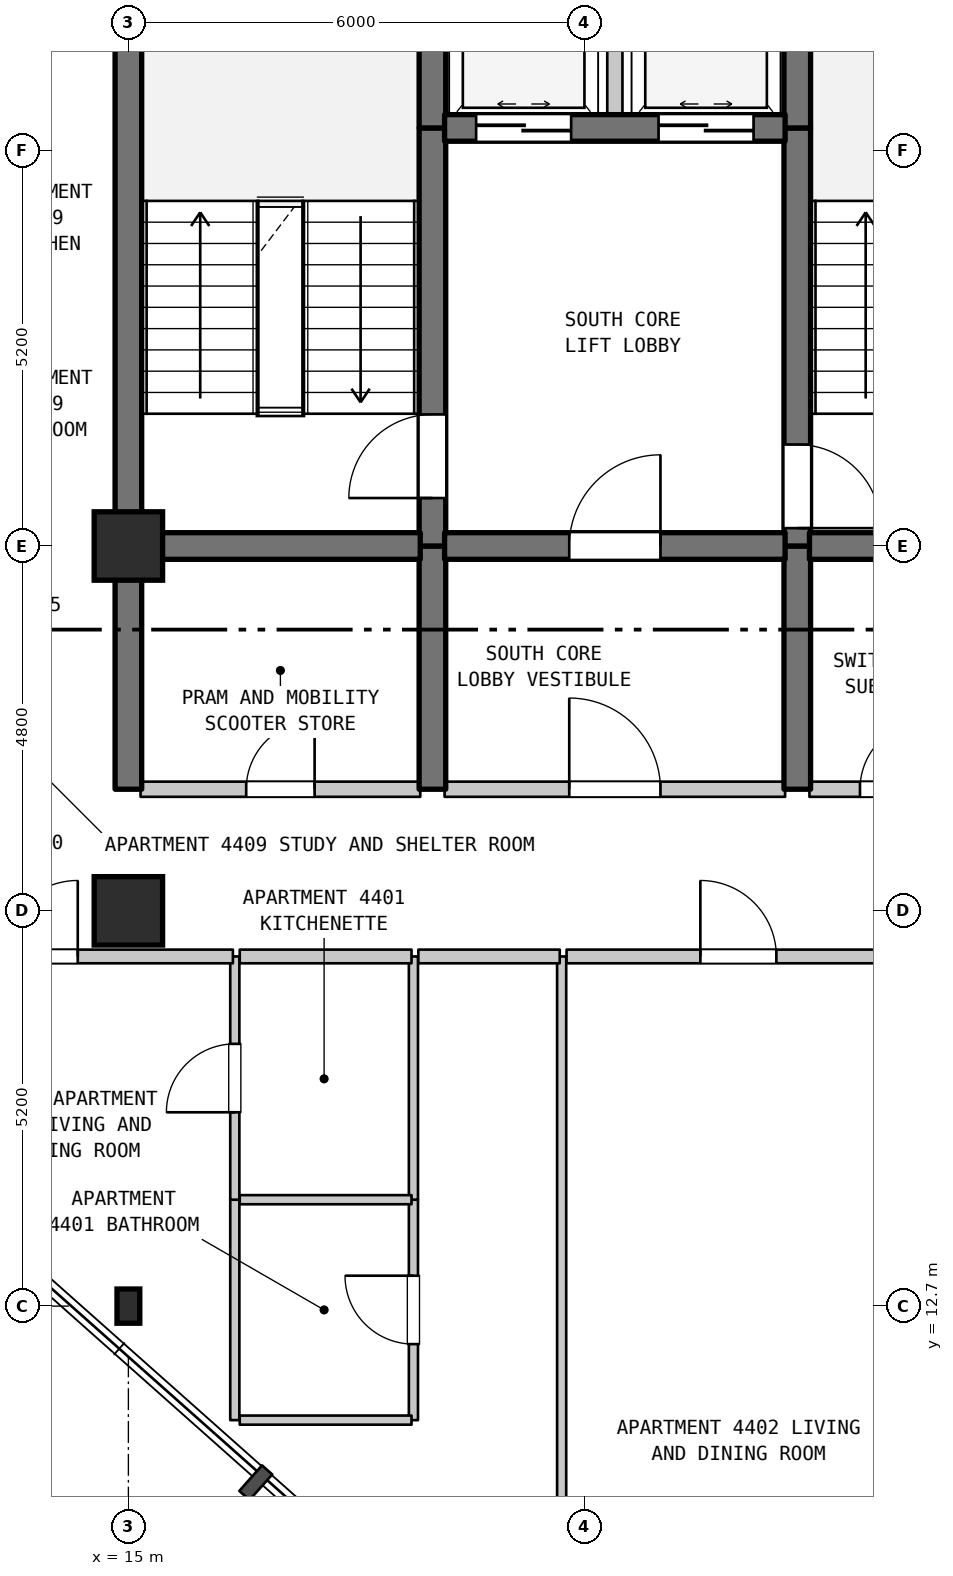
"""IFC4 building model, lengths in metres.
Left out: names, types, materials, properties, quantities, classifications, styles, units other than length and angle.
Written with IfcOpenShell. Run it as: python <this file> out.ifc"""

import sys

from ifc_helpers import new_model, si_unit, direction, frame, frame_2d, origin, origin_2d, place, context, subcontext, project, spatial, rectangle, i_section, extrude, element, fill, save


model = new_model("IFC4")
c1 = context("Model", 3, precision=1e-05, world=origin(), true_north=direction((0.0, 1.0)))
c2 = subcontext(c1, "Body", "Model", "MODEL_VIEW")
j1 = project(units=[si_unit("LENGTHUNIT", "METRE"), si_unit("PLANEANGLEUNIT", "RADIAN")], contexts=[c1])
p1 = place(None, origin())
s1 = spatial("IfcSite", under=j1, at=p1, CompositionType="ELEMENT")
p2 = place(p1, origin())
s2 = spatial("IfcBuilding", under=s1, at=p2, CompositionType="ELEMENT")
p3 = place(p2, frame((0.0, 0.0, 180.2)))
s3 = spatial("IfcBuildingStorey", under=s2, at=p3, CompositionType="ELEMENT", Elevation=180.2)
p4 = place(p3, frame((15.0, 12.7, 0.0), z_axis=(0.0, 0.0, 1.0), x_axis=(1.0, 0.0, 0.0)))
e1 = element("IfcColumn", 1, at=p4, inside=s3, PredefinedType="COLUMN", context=c2, shape_type="SweptSolid", body=[
    extrude(i_section(OverallWidth=0.3, OverallDepth=0.45, WebThickness=0.014, FlangeThickness=0.026, FilletRadius=0.027, at=origin_2d()), origin(), (0.0, 0.0, 1.0), 3.7),
])
for number, where, z_axis, x_axis in (
    (2, (15.0, 17.9, 0.0), (0.0, 0.0, 1.0), (1.0, 0.0, 0.0)),
    (3, (15.0, 22.7, 0.0), (0.0, 0.0, 1.0), (1.0, 0.0, 0.0)),
):
    element("IfcColumn", number, at=place(p3, frame(where, z_axis=z_axis, x_axis=x_axis)), inside=s3, PredefinedType="COLUMN", context=c2, shape_type="SweptSolid", body=[
        extrude(rectangle(XDim=0.9, YDim=0.9, at=origin_2d()), origin(), (0.0, 0.0, 1.0), 3.7),
    ])
p5 = place(p3, frame((15.0, 19.5, 0.0), z_axis=(0.0, 0.0, 1.0), x_axis=(0.0, 1.0, 0.0)))
e4 = element("IfcWall", 4, at=p5, inside=s3, PredefinedType="SHEAR", context=c2, shape_type="SweptSolid", body=[
    extrude(rectangle(XDim=3.2, YDim=0.35, at=frame_2d((1.6, 0.0))), origin(), (0.0, 0.0, 1.0), 3.38),
])
p6 = place(p3, frame((15.0, 22.7, 0.0), z_axis=(0.0, 0.0, 1.0), x_axis=(0.0, 1.0, 0.0)))
e5 = element("IfcWall", 5, at=p6, inside=s3, PredefinedType="SHEAR", context=c2, shape_type="SweptSolid", body=[
    extrude(rectangle(XDim=6.8, YDim=0.35, at=frame_2d((3.4, 0.0))), origin(), (0.0, 0.0, 1.0), 3.38),
])
p7 = place(p3, frame((16.4, 11.2, 0.0), z_axis=(0.0, 0.0, 1.0), x_axis=(0.0, 1.0, 0.0)))
e6 = element("IfcWall", 6, at=p7, inside=s3, PredefinedType="PARTITIONING", context=c2, shape_type="SweptSolid", body=[
    extrude(rectangle(XDim=2.9, YDim=0.12, at=frame_2d((1.45, 0.0))), origin(), (0.0, 0.0, 1.0), 3.38),
])
p8 = place(p3, frame((16.4, 14.1, 0.0), z_axis=(0.0, 0.0, 1.0), x_axis=(0.0, 1.0, 0.0)))
e7 = element("IfcWall", 7, at=p8, inside=s3, PredefinedType="PARTITIONING", context=c2, shape_type="SweptSolid", body=[
    extrude(rectangle(XDim=3.2, YDim=0.12, at=frame_2d((1.6, 0.0))), origin(), (0.0, 0.0, 1.0), 3.38),
])
p9 = place(p8, frame((1.15, 0.0, 0.0)))
e8 = element("IfcOpeningElement", 8, at=p9, cuts=e7, PredefinedType="OPENING", context=c2, shape_type="SweptSolid", body=[
    extrude(rectangle(XDim=0.9, YDim=2.15, at=frame_2d((0.45, 1.075))), frame((0.0, 0.07, 0.0), z_axis=(0.0, -1.0, 0.0), x_axis=(1.0, 0.0, 0.0)), (0.0, 0.0, 1.0), 0.14),
])
p10 = place(p3, frame((18.75, 11.2, 0.0), z_axis=(0.0, 0.0, 1.0), x_axis=(0.0, 1.0, 0.0)))
e9 = element("IfcWall", 9, at=p10, inside=s3, PredefinedType="PARTITIONING", context=c2, shape_type="SweptSolid", body=[
    extrude(rectangle(XDim=2.9, YDim=0.12, at=frame_2d((1.45, 0.0))), origin(), (0.0, 0.0, 1.0), 3.38),
])
p11 = place(p10, frame((1.0, 0.0, 0.0)))
e10 = element("IfcOpeningElement", 10, at=p11, cuts=e9, PredefinedType="OPENING", context=c2, shape_type="SweptSolid", body=[
    extrude(rectangle(XDim=0.9, YDim=2.1, at=frame_2d((0.45, 1.05))), frame((0.0, 0.07, 0.0), z_axis=(0.0, -1.0, 0.0), x_axis=(1.0, 0.0, 0.0)), (0.0, 0.0, 1.0), 0.14),
])
p12 = place(p3, frame((18.75, 14.1, 0.0), z_axis=(0.0, 0.0, 1.0), x_axis=(0.0, 1.0, 0.0)))
e11 = element("IfcWall", 11, at=p12, inside=s3, PredefinedType="PARTITIONING", context=c2, shape_type="SweptSolid", body=[
    extrude(rectangle(XDim=3.2, YDim=0.12, at=frame_2d((1.6, 0.0))), origin(), (0.0, 0.0, 1.0), 3.38),
])
p13 = place(p3, frame((19.0, 19.5, 0.0), z_axis=(0.0, 0.0, 1.0), x_axis=(0.0, 1.0, 0.0)))
e12 = element("IfcWall", 12, at=p13, inside=s3, PredefinedType="SHEAR", context=c2, shape_type="SweptSolid", body=[
    extrude(rectangle(XDim=3.2, YDim=0.35, at=frame_2d((1.6, 0.0))), origin(), (0.0, 0.0, 1.0), 3.38),
])
p14 = place(p3, frame((19.0, 22.7, 0.0), z_axis=(0.0, 0.0, 1.0), x_axis=(0.0, 1.0, 0.0)))
e13 = element("IfcWall", 13, at=p14, inside=s3, PredefinedType="SHEAR", context=c2, shape_type="SweptSolid", body=[
    extrude(rectangle(XDim=5.5, YDim=0.35, at=frame_2d((2.75, 0.0))), origin(), (0.0, 0.0, 1.0), 3.38),
])
p15 = place(p14, frame((0.631, 0.0, 0.0)))
e14 = element("IfcOpeningElement", 14, at=p15, cuts=e13, PredefinedType="OPENING", context=c2, shape_type="SweptSolid", body=[
    extrude(rectangle(XDim=1.1, YDim=2.15, at=frame_2d((0.55, 1.075))), frame((0.0, 0.185, 0.0), z_axis=(0.0, -1.0, 0.0), x_axis=(1.0, 0.0, 0.0)), (0.0, 0.0, 1.0), 0.37),
])
p16 = place(p3, frame((19.0, 28.2, 0.0), z_axis=(0.0, 0.0, 1.0), x_axis=(0.0, 1.0, 0.0)))
e15 = element("IfcWall", 15, at=p16, inside=s3, PredefinedType="SHEAR", context=c2, shape_type="SweptSolid", body=[
    extrude(rectangle(XDim=1.3, YDim=0.35, at=frame_2d((0.65, 0.0))), origin(), (0.0, 0.0, 1.0), 3.38),
])
p17 = place(p3, frame((20.7, 6.977, 0.0), z_axis=(0.0, 0.0, 1.0), x_axis=(0.0, 1.0, 0.0)))
e16 = element("IfcWall", 16, at=p17, inside=s3, PredefinedType="PARTITIONING", context=c2, shape_type="SweptSolid", body=[
    extrude(rectangle(XDim=10.323, YDim=0.12, at=frame_2d((5.162, 0.0))), origin(), (0.0, 0.0, 1.0), 3.38),
])
p18 = place(p3, frame((21.4, 28.2, 0.0), z_axis=(0.0, 0.0, 1.0), x_axis=(0.0, 1.0, 0.0)))
e17 = element("IfcWall", 17, at=p18, inside=s3, PredefinedType="STANDARD", context=c2, shape_type="SweptSolid", body=[
    extrude(rectangle(XDim=2.6, YDim=0.2, at=frame_2d((1.3, 0.0))), origin(), (0.0, 0.0, 1.0), 3.38),
])
p19 = place(p3, frame((23.8, 19.5, 0.0), z_axis=(0.0, 0.0, 1.0), x_axis=(0.0, 1.0, 0.0)))
e18 = element("IfcWall", 18, at=p19, inside=s3, PredefinedType="SHEAR", context=c2, shape_type="SweptSolid", body=[
    extrude(rectangle(XDim=3.2, YDim=0.35, at=frame_2d((1.6, 0.0))), origin(), (0.0, 0.0, 1.0), 3.38),
])
p20 = place(p3, frame((23.8, 22.7, 0.0), z_axis=(0.0, 0.0, 1.0), x_axis=(0.0, 1.0, 0.0)))
e19 = element("IfcWall", 19, at=p20, inside=s3, PredefinedType="SHEAR", context=c2, shape_type="SweptSolid", body=[
    extrude(rectangle(XDim=5.5, YDim=0.35, at=frame_2d((2.75, 0.0))), origin(), (0.0, 0.0, 1.0), 3.38),
])
p21 = place(p20, frame((0.235, 0.0, 0.0)))
e20 = element("IfcOpeningElement", 20, at=p21, cuts=e19, PredefinedType="OPENING", context=c2, shape_type="SweptSolid", body=[
    extrude(rectangle(XDim=1.1, YDim=2.15, at=frame_2d((0.55, 1.075))), frame((0.0, 0.185, 0.0), z_axis=(0.0, -1.0, 0.0), x_axis=(1.0, 0.0, 0.0)), (0.0, 0.0, 1.0), 0.37),
])
p22 = place(p3, frame((23.8, 28.2, 0.0), z_axis=(0.0, 0.0, 1.0), x_axis=(0.0, 1.0, 0.0)))
e21 = element("IfcWall", 21, at=p22, inside=s3, PredefinedType="SHEAR", context=c2, shape_type="SweptSolid", body=[
    extrude(rectangle(XDim=1.3, YDim=0.35, at=frame_2d((0.65, 0.0))), origin(), (0.0, 0.0, 1.0), 3.38),
])
for number, where, z_axis, x_axis in (
    (22, (16.465, 11.2, 0.0), (0.0, 0.0, 1.0), (1.0, 0.0, 0.0)),
    (23, (16.465, 14.1, 0.0), (0.0, 0.0, 1.0), (1.0, 0.0, 0.0)),
):
    element("IfcWall", number, at=place(p3, frame(where, z_axis=z_axis, x_axis=x_axis)), inside=s3, PredefinedType="PARTITIONING", context=c2, shape_type="SweptSolid", body=[
        extrude(rectangle(XDim=2.26, YDim=0.12, at=frame_2d((1.13, 0.0))), origin(), (0.0, 0.0, 1.0), 3.38),
    ])
p23 = place(p3, frame((12.875, 17.3, 0.0), z_axis=(0.0, 0.0, 1.0), x_axis=(1.0, 0.0, 0.0)))
e24 = element("IfcWall", 24, at=p23, inside=s3, PredefinedType="STANDARD", context=c2, shape_type="SweptSolid", body=[
    extrude(rectangle(XDim=3.5, YDim=0.18, at=frame_2d((1.75, 0.0))), origin(), (0.0, 0.0, 1.0), 3.38),
])
p24 = place(p23, frame((0.459, 0.0, 0.0)))
e25 = element("IfcOpeningElement", 25, at=p24, cuts=e24, PredefinedType="OPENING", context=c2, shape_type="SweptSolid", body=[
    extrude(rectangle(XDim=1.0, YDim=2.15, at=frame_2d((0.5, 1.075))), frame((0.0, 0.1, 0.0), z_axis=(0.0, -1.0, 0.0), x_axis=(1.0, 0.0, 0.0)), (0.0, 0.0, 1.0), 0.2),
])
p25 = place(p3, frame((16.465, 17.3, 0.0), z_axis=(0.0, 0.0, 1.0), x_axis=(1.0, 0.0, 0.0)))
e26 = element("IfcWall", 26, at=p25, inside=s3, PredefinedType="STANDARD", context=c2, shape_type="SweptSolid", body=[
    extrude(rectangle(XDim=2.26, YDim=0.18, at=frame_2d((1.13, 0.0))), origin(), (0.0, 0.0, 1.0), 3.38),
])
p26 = place(p3, frame((18.815, 17.3, 0.0), z_axis=(0.0, 0.0, 1.0), x_axis=(1.0, 0.0, 0.0)))
e27 = element("IfcWall", 27, at=p26, inside=s3, PredefinedType="STANDARD", context=c2, shape_type="SweptSolid", body=[
    extrude(rectangle(XDim=1.86, YDim=0.18, at=frame_2d((0.93, 0.0))), origin(), (0.0, 0.0, 1.0), 3.38),
])
p27 = place(p3, frame((20.765, 17.3, 0.0), z_axis=(0.0, 0.0, 1.0), x_axis=(1.0, 0.0, 0.0)))
e28 = element("IfcWall", 28, at=p27, inside=s3, PredefinedType="STANDARD", context=c2, shape_type="SweptSolid", body=[
    extrude(rectangle(XDim=4.52, YDim=0.18, at=frame_2d((2.26, 0.0))), origin(), (0.0, 0.0, 1.0), 3.38),
])
p28 = place(p27, frame((1.76, 0.0, 0.0)))
e29 = element("IfcOpeningElement", 29, at=p28, cuts=e28, PredefinedType="OPENING", context=c2, shape_type="SweptSolid", body=[
    extrude(rectangle(XDim=1.0, YDim=2.15, at=frame_2d((0.5, 1.075))), frame((0.0, 0.1, 0.0), z_axis=(0.0, -1.0, 0.0), x_axis=(1.0, 0.0, 0.0)), (0.0, 0.0, 1.0), 0.2),
])
p29 = place(p3, frame((15.16, 19.5, 0.0), z_axis=(0.0, 0.0, 1.0), x_axis=(1.0, 0.0, 0.0)))
e30 = element("IfcWall", 30, at=p29, inside=s3, PredefinedType="STANDARD", context=c2, shape_type="SweptSolid", body=[
    extrude(rectangle(XDim=3.68, YDim=0.2, at=frame_2d((1.84, 0.0))), origin(), (0.0, 0.0, 1.0), 3.38),
])
p30 = place(p29, frame((1.39, 0.0, 0.0)))
e31 = element("IfcOpeningElement", 31, at=p30, cuts=e30, PredefinedType="OPENING", context=c2, shape_type="SweptSolid", body=[
    extrude(rectangle(XDim=0.9, YDim=2.15, at=frame_2d((0.45, 1.075))), frame((0.0, 0.11, 0.0), z_axis=(0.0, -1.0, 0.0), x_axis=(1.0, 0.0, 0.0)), (0.0, 0.0, 1.0), 0.22),
])
p31 = place(p3, frame((19.16, 19.5, 0.0), z_axis=(0.0, 0.0, 1.0), x_axis=(1.0, 0.0, 0.0)))
e32 = element("IfcWall", 32, at=p31, inside=s3, PredefinedType="STANDARD", context=c2, shape_type="SweptSolid", body=[
    extrude(rectangle(XDim=4.48, YDim=0.2, at=frame_2d((2.24, 0.0))), origin(), (0.0, 0.0, 1.0), 3.38),
])
p32 = place(p31, frame((1.64, 0.0, 0.0)))
e33 = element("IfcOpeningElement", 33, at=p32, cuts=e32, PredefinedType="OPENING", context=c2, shape_type="SweptSolid", body=[
    extrude(rectangle(XDim=1.2, YDim=2.2, at=frame_2d((0.6, 1.1))), frame((0.0, 0.11, 0.0), z_axis=(0.0, -1.0, 0.0), x_axis=(1.0, 0.0, 0.0)), (0.0, 0.0, 1.0), 0.22),
])
p33 = place(p3, frame((23.96, 19.5, 0.0), z_axis=(0.0, 0.0, 1.0), x_axis=(1.0, 0.0, 0.0)))
e34 = element("IfcWall", 34, at=p33, inside=s3, PredefinedType="STANDARD", context=c2, shape_type="SweptSolid", body=[
    extrude(rectangle(XDim=4.455, YDim=0.2, at=frame_2d((2.228, 0.0))), origin(), (0.0, 0.0, 1.0), 3.38),
])
p34 = place(p33, frame((0.665, 0.0, 0.0)))
e35 = element("IfcOpeningElement", 35, at=p34, cuts=e34, PredefinedType="OPENING", context=c2, shape_type="SweptSolid", body=[
    extrude(rectangle(XDim=0.9, YDim=2.15, at=frame_2d((0.45, 1.075))), frame((0.0, 0.11, 0.0), z_axis=(0.0, -1.0, 0.0), x_axis=(1.0, 0.0, 0.0)), (0.0, 0.0, 1.0), 0.22),
])
p35 = place(p33, frame((2.791, 0.0, 0.0)))
e36 = element("IfcOpeningElement", 36, at=p35, cuts=e34, PredefinedType="OPENING", context=c2, shape_type="SweptSolid", body=[
    extrude(rectangle(XDim=0.9, YDim=2.15, at=frame_2d((0.45, 1.075))), frame((0.0, 0.11, 0.0), z_axis=(0.0, -1.0, 0.0), x_axis=(1.0, 0.0, 0.0)), (0.0, 0.0, 1.0), 0.22),
])
p36 = place(p3, frame((15.16, 22.7, 0.0), z_axis=(0.0, 0.0, 1.0), x_axis=(1.0, 0.0, 0.0)))
e37 = element("IfcWall", 37, at=p36, inside=s3, PredefinedType="SHEAR", context=c2, shape_type="SweptSolid", body=[
    extrude(rectangle(XDim=3.68, YDim=0.35, at=frame_2d((1.84, 0.0))), origin(), (0.0, 0.0, 1.0), 3.38),
])
p37 = place(p3, frame((19.16, 22.7, 0.0), z_axis=(0.0, 0.0, 1.0), x_axis=(1.0, 0.0, 0.0)))
e38 = element("IfcWall", 38, at=p37, inside=s3, PredefinedType="SHEAR", context=c2, shape_type="SweptSolid", body=[
    extrude(rectangle(XDim=4.48, YDim=0.35, at=frame_2d((2.24, 0.0))), origin(), (0.0, 0.0, 1.0), 3.38),
])
p38 = place(p37, frame((1.64, 0.0, 0.0)))
e39 = element("IfcOpeningElement", 39, at=p38, cuts=e38, PredefinedType="OPENING", context=c2, shape_type="SweptSolid", body=[
    extrude(rectangle(XDim=1.2, YDim=2.2, at=frame_2d((0.6, 1.1))), frame((0.0, 0.185, 0.0), z_axis=(0.0, -1.0, 0.0), x_axis=(1.0, 0.0, 0.0)), (0.0, 0.0, 1.0), 0.37),
])
p39 = place(p3, frame((23.96, 22.7, 0.0), z_axis=(0.0, 0.0, 1.0), x_axis=(1.0, 0.0, 0.0)))
e40 = element("IfcWall", 40, at=p39, inside=s3, PredefinedType="SHEAR", context=c2, shape_type="SweptSolid", body=[
    extrude(rectangle(XDim=3.18, YDim=0.35, at=frame_2d((1.59, 0.0))), origin(), (0.0, 0.0, 1.0), 3.38),
])
p40 = place(p3, frame((19.16, 28.2, 0.0), z_axis=(0.0, 0.0, 1.0), x_axis=(1.0, 0.0, 0.0)))
e41 = element("IfcWall", 41, at=p40, inside=s3, PredefinedType="SHEAR", context=c2, shape_type="SweptSolid", body=[
    extrude(rectangle(XDim=4.48, YDim=0.35, at=frame_2d((2.24, 0.0))), origin(), (0.0, 0.0, 1.0), 3.38),
])
p41 = place(p40, frame((0.415, 0.0, 0.0)))
e42 = element("IfcOpeningElement", 42, at=p41, cuts=e41, PredefinedType="OPENING", context=c2, shape_type="SweptSolid", body=[
    extrude(rectangle(XDim=1.25, YDim=2.2, at=frame_2d((0.625, 1.1))), frame((0.0, 0.185, 0.0), z_axis=(0.0, -1.0, 0.0), x_axis=(1.0, 0.0, 0.0)), (0.0, 0.0, 1.0), 0.37),
])
p42 = place(p40, frame((2.815, 0.0, 0.0)))
e43 = element("IfcOpeningElement", 43, at=p42, cuts=e41, PredefinedType="OPENING", context=c2, shape_type="SweptSolid", body=[
    extrude(rectangle(XDim=1.25, YDim=2.2, at=frame_2d((0.625, 1.1))), frame((0.0, 0.185, 0.0), z_axis=(0.0, -1.0, 0.0), x_axis=(1.0, 0.0, 0.0)), (0.0, 0.0, 1.0), 0.37),
])
p43 = place(p9, origin())
e44 = element("IfcDoor", 44, at=p43, inside=s3, OperationType="SINGLE_SWING_LEFT", PredefinedType="DOOR", context=c2, shape_type="SweptSolid", body=[
    extrude(rectangle(XDim=0.9, YDim=2.15, at=frame_2d((0.45, 1.075))), frame((0.0, 0.025, 0.0), z_axis=(0.0, -1.0, 0.0), x_axis=(1.0, 0.0, 0.0)), (0.0, 0.0, 1.0), 0.05),
])
fill(e8, e44)
p44 = place(p11, origin())
e45 = element("IfcDoor", 45, at=p44, inside=s3, OperationType="SINGLE_SWING_RIGHT", PredefinedType="DOOR", context=c2, shape_type="SweptSolid", body=[
    extrude(rectangle(XDim=0.9, YDim=2.1, at=frame_2d((0.45, 1.05))), frame((0.0, 0.025, 0.0), z_axis=(0.0, -1.0, 0.0), x_axis=(1.0, 0.0, 0.0)), (0.0, 0.0, 1.0), 0.05),
])
fill(e10, e45)
p45 = place(p15, origin())
e46 = element("IfcDoor", 46, at=p45, inside=s3, OperationType="SINGLE_SWING_LEFT", PredefinedType="DOOR", context=c2, shape_type="SweptSolid", body=[
    extrude(rectangle(XDim=1.1, YDim=2.15, at=frame_2d((0.55, 1.075))), frame((0.0, 0.025, 0.0), z_axis=(0.0, -1.0, 0.0), x_axis=(1.0, 0.0, 0.0)), (0.0, 0.0, 1.0), 0.05),
])
fill(e14, e46)
p46 = place(p21, frame((1.1, 0.0, 0.0), z_axis=(0.0, 0.0, 1.0), x_axis=(-1.0, 0.0, 0.0)))
e47 = element("IfcDoor", 47, at=p46, inside=s3, OperationType="SINGLE_SWING_LEFT", PredefinedType="DOOR", context=c2, shape_type="SweptSolid", body=[
    extrude(rectangle(XDim=1.1, YDim=2.15, at=frame_2d((0.55, 1.075))), frame((0.0, 0.025, 0.0), z_axis=(0.0, -1.0, 0.0), x_axis=(1.0, 0.0, 0.0)), (0.0, 0.0, 1.0), 0.05),
])
fill(e20, e47)
p47 = place(p24, origin())
e48 = element("IfcDoor", 48, at=p47, inside=s3, OperationType="SINGLE_SWING_RIGHT", PredefinedType="DOOR", context=c2, shape_type="SweptSolid", body=[
    extrude(rectangle(XDim=1.0, YDim=2.15, at=frame_2d((0.5, 1.075))), frame((0.0, 0.025, 0.0), z_axis=(0.0, -1.0, 0.0), x_axis=(1.0, 0.0, 0.0)), (0.0, 0.0, 1.0), 0.05),
])
fill(e25, e48)
p48 = place(p28, origin())
e49 = element("IfcDoor", 49, at=p48, inside=s3, OperationType="SINGLE_SWING_LEFT", PredefinedType="DOOR", context=c2, shape_type="SweptSolid", body=[
    extrude(rectangle(XDim=1.0, YDim=2.15, at=frame_2d((0.5, 1.075))), frame((0.0, 0.025, 0.0), z_axis=(0.0, -1.0, 0.0), x_axis=(1.0, 0.0, 0.0)), (0.0, 0.0, 1.0), 0.05),
])
fill(e29, e49)
p49 = place(p30, origin())
e50 = element("IfcDoor", 50, at=p49, inside=s3, OperationType="SINGLE_SWING_RIGHT", PredefinedType="DOOR", context=c2, shape_type="SweptSolid", body=[
    extrude(rectangle(XDim=0.9, YDim=2.15, at=frame_2d((0.45, 1.075))), frame((0.0, 0.025, 0.0), z_axis=(0.0, -1.0, 0.0), x_axis=(1.0, 0.0, 0.0)), (0.0, 0.0, 1.0), 0.05),
])
fill(e31, e50)
p50 = place(p32, origin())
e51 = element("IfcDoor", 51, at=p50, inside=s3, OperationType="SINGLE_SWING_LEFT", PredefinedType="DOOR", context=c2, shape_type="SweptSolid", body=[
    extrude(rectangle(XDim=1.2, YDim=2.2, at=frame_2d((0.6, 1.1))), frame((0.0, 0.025, 0.0), z_axis=(0.0, -1.0, 0.0), x_axis=(1.0, 0.0, 0.0)), (0.0, 0.0, 1.0), 0.05),
])
fill(e33, e51)
p51 = place(p34, origin())
e52 = element("IfcDoor", 52, at=p51, inside=s3, OperationType="SINGLE_SWING_RIGHT", PredefinedType="DOOR", context=c2, shape_type="SweptSolid", body=[
    extrude(rectangle(XDim=0.9, YDim=2.15, at=frame_2d((0.45, 1.075))), frame((0.0, 0.025, 0.0), z_axis=(0.0, -1.0, 0.0), x_axis=(1.0, 0.0, 0.0)), (0.0, 0.0, 1.0), 0.05),
])
fill(e35, e52)
p52 = place(p38, origin())
e53 = element("IfcDoor", 53, at=p52, inside=s3, OperationType="SINGLE_SWING_RIGHT", PredefinedType="DOOR", context=c2, shape_type="SweptSolid", body=[
    extrude(rectangle(XDim=1.2, YDim=2.2, at=frame_2d((0.6, 1.1))), frame((0.0, 0.025, 0.0), z_axis=(0.0, -1.0, 0.0), x_axis=(1.0, 0.0, 0.0)), (0.0, 0.0, 1.0), 0.05),
])
fill(e39, e53)
p53 = place(p41, origin())
e54 = element("IfcDoor", 54, at=p53, inside=s3, OperationType="DOUBLE_DOOR_SLIDING", PredefinedType="DOOR", context=c2, shape_type="SweptSolid", body=[
    extrude(rectangle(XDim=1.25, YDim=2.2, at=frame_2d((0.625, 1.1))), frame((0.0, 0.025, 0.0), z_axis=(0.0, -1.0, 0.0), x_axis=(1.0, 0.0, 0.0)), (0.0, 0.0, 1.0), 0.05),
])
fill(e42, e54)
p54 = place(p42, origin())
e55 = element("IfcDoor", 55, at=p54, inside=s3, OperationType="DOUBLE_DOOR_SLIDING", PredefinedType="DOOR", context=c2, shape_type="SweptSolid", body=[
    extrude(rectangle(XDim=1.25, YDim=2.2, at=frame_2d((0.625, 1.1))), frame((0.0, 0.025, 0.0), z_axis=(0.0, -1.0, 0.0), x_axis=(1.0, 0.0, 0.0)), (0.0, 0.0, 1.0), 0.05),
])
fill(e43, e55)
save(model, sys.argv[1])
